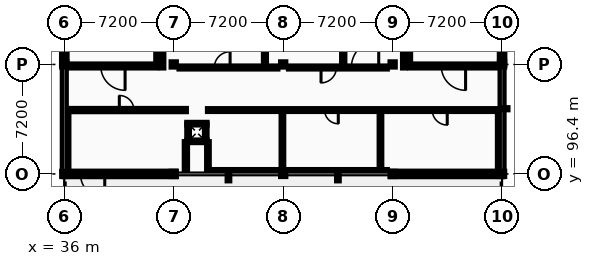
"""IFC4 building model, lengths in metres.
Left out: names, types, materials, properties, quantities, classifications, styles, units other than length and angle.
Written with IfcOpenShell. Run it as: python <this file> out.ifc"""

import sys

from ifc_helpers import new_model, si_unit, direction, frame, frame_2d, origin, origin_2d, place, context, subcontext, project, spatial, rectangle, i_section, extrude, element, fill, save


model = new_model("IFC4")
c1 = context("Model", 3, precision=1e-05, world=origin(), true_north=direction((0.0, 1.0)))
c2 = subcontext(c1, "Body", "Model", "MODEL_VIEW")
j1 = project(units=[si_unit("LENGTHUNIT", "METRE"), si_unit("PLANEANGLEUNIT", "RADIAN")], contexts=[c1])
p1 = place(None, origin())
s1 = spatial("IfcSite", under=j1, at=p1, CompositionType="ELEMENT")
p2 = place(p1, origin())
s2 = spatial("IfcBuilding", under=s1, at=p2, CompositionType="ELEMENT")
p3 = place(p2, frame((0.0, 0.0, 22.8)))
s3 = spatial("IfcBuildingStorey", under=s2, at=p3, CompositionType="ELEMENT", Elevation=22.8)
for number, where, z_axis, x_axis in (
    (1, (36.0, 96.4, 0.0), (0.0, 0.0, 1.0), (1.0, 0.0, 0.0)),
    (2, (36.0, 103.6, 0.0), (0.0, 0.0, 1.0), (1.0, 0.0, 0.0)),
    (3, (43.2, 96.4, 0.0), (0.0, 0.0, 1.0), (1.0, 0.0, 0.0)),
    (4, (43.2, 103.6, 0.0), (0.0, 0.0, 1.0), (1.0, 0.0, 0.0)),
    (5, (50.4, 96.4, 0.0), (0.0, 0.0, 1.0), (1.0, 0.0, 0.0)),
    (6, (50.4, 103.6, 0.0), (0.0, 0.0, 1.0), (1.0, 0.0, 0.0)),
    (7, (57.6, 96.4, 0.0), (0.0, 0.0, 1.0), (1.0, 0.0, 0.0)),
    (8, (57.6, 103.6, 0.0), (0.0, 0.0, 1.0), (1.0, 0.0, 0.0)),
    (9, (64.8, 96.4, 0.0), (0.0, 0.0, 1.0), (1.0, 0.0, 0.0)),
    (10, (64.8, 103.6, 0.0), (0.0, 0.0, 1.0), (1.0, 0.0, 0.0)),
):
    element("IfcColumn", number, at=place(p3, frame(where, z_axis=z_axis, x_axis=x_axis)), inside=s3, PredefinedType="COLUMN", context=c2, shape_type="SweptSolid", body=[
        extrude(i_section(OverallWidth=0.28, OverallDepth=0.28, WebThickness=0.01, FlangeThickness=0.018, FilletRadius=0.024, at=origin_2d()), origin(), (0.0, 0.0, 1.0), 4.4),
    ])
p4 = place(p3, frame((36.0, 96.4, 0.0), z_axis=(0.0, 0.0, 1.0), x_axis=(1.0, 0.0, 0.0)))
e11 = element("IfcWall", 11, at=p4, inside=s3, PredefinedType="STANDARD", context=c2, shape_type="SweptSolid", body=[
    extrude(rectangle(XDim=7.31, YDim=0.3, at=frame_2d((3.655, 0.0))), origin(), (0.0, 0.0, 1.0), 4.035),
])
p5 = place(p4, frame((1.062, 0.0, 0.0)))
e12 = element("IfcOpeningElement", 12, at=p5, cuts=e11, PredefinedType="OPENING", context=c2, shape_type="SweptSolid", body=[
    extrude(rectangle(XDim=1.6, YDim=2.2, at=frame_2d((0.8, 1.1))), frame((0.0, 0.16, 0.0), z_axis=(0.0, -1.0, 0.0), x_axis=(1.0, 0.0, 0.0)), (0.0, 0.0, 1.0), 0.32),
])
p6 = place(p3, frame((57.49, 96.4, 0.0), z_axis=(0.0, 0.0, 1.0), x_axis=(1.0, 0.0, 0.0)))
e13 = element("IfcWall", 13, at=p6, inside=s3, PredefinedType="STANDARD", context=c2, shape_type="SweptSolid", body=[
    extrude(rectangle(XDim=7.31, YDim=0.3, at=frame_2d((3.655, 0.0))), origin(), (0.0, 0.0, 1.0), 4.035),
])
p7 = place(p3, frame((36.0, 106.8, 0.0), z_axis=(0.0, 0.0, 1.0), x_axis=(0.0, -1.0, 0.0)))
e14 = element("IfcWall", 14, at=p7, inside=s3, PredefinedType="STANDARD", context=c2, shape_type="SweptSolid", body=[
    extrude(rectangle(XDim=3.2, YDim=0.3, at=frame_2d((1.6, 0.0))), origin(), (0.0, 0.0, 1.0), 4.11),
])
p8 = place(p7, frame((1.034, 0.0, 0.95)))
e15 = element("IfcOpeningElement", 15, at=p8, cuts=e14, PredefinedType="OPENING", context=c2, shape_type="SweptSolid", body=[
    extrude(rectangle(XDim=1.132, YDim=1.296, at=frame_2d((0.566, 0.648))), frame((0.0, 0.16, 0.0), z_axis=(0.0, -1.0, 0.0), x_axis=(1.0, 0.0, 0.0)), (0.0, 0.0, 1.0), 0.32),
])
p9 = place(p3, frame((64.8, 103.6, 0.0), z_axis=(0.0, 0.0, 1.0), x_axis=(0.0, 1.0, 0.0)))
e16 = element("IfcWall", 16, at=p9, inside=s3, PredefinedType="STANDARD", context=c2, shape_type="SweptSolid", body=[
    extrude(rectangle(XDim=3.2, YDim=0.3, at=frame_2d((1.6, 0.0))), origin(), (0.0, 0.0, 1.0), 4.11),
])
p10 = place(p9, frame((1.0, 0.0, 0.95)))
e17 = element("IfcOpeningElement", 17, at=p10, cuts=e16, PredefinedType="OPENING", context=c2, shape_type="SweptSolid", body=[
    extrude(rectangle(XDim=1.2, YDim=1.296, at=frame_2d((0.6, 0.648))), frame((0.0, 0.16, 0.0), z_axis=(0.0, -1.0, 0.0), x_axis=(1.0, 0.0, 0.0)), (0.0, 0.0, 1.0), 0.32),
])
for number, where, z_axis, x_axis in (
    (18, (36.0, 96.6, 4.4), (0.0, 0.0, 1.0), (0.0, 1.0, 0.0)),
    (19, (64.8, 96.6, 4.4), (0.0, 0.0, 1.0), (0.0, 1.0, 0.0)),
):
    element("IfcWall", number, at=place(p3, frame(where, z_axis=z_axis, x_axis=x_axis)), inside=s3, PredefinedType="PARAPET", context=c2, shape_type="SweptSolid", body=[
        extrude(rectangle(XDim=21.2, YDim=0.2, at=frame_2d((10.6, 0.0))), origin(), (0.0, 0.0, 1.0), 0.55),
    ])
p11 = place(p3, frame((36.35, 103.5, 0.0), z_axis=(0.0, 0.0, 1.0), x_axis=(1.0, 0.0, 0.0)))
e20 = element("IfcWall", 20, at=p11, inside=s3, PredefinedType="PARTITIONING", context=c2, shape_type="SweptSolid", body=[
    extrude(rectangle(XDim=5.7, YDim=0.2, at=frame_2d((2.85, 0.0))), origin(), (0.0, 0.0, 1.0), 4.035),
])
p12 = place(p11, frame((2.05, 0.0, 0.0)))
e21 = element("IfcOpeningElement", 21, at=p12, cuts=e20, PredefinedType="OPENING", context=c2, shape_type="SweptSolid", body=[
    extrude(rectangle(XDim=1.6, YDim=2.2, at=frame_2d((0.8, 1.1))), frame((0.0, 0.11, 0.0), z_axis=(0.0, -1.0, 0.0), x_axis=(1.0, 0.0, 0.0)), (0.0, 0.0, 1.0), 0.22),
])
p13 = place(p3, frame((42.15, 103.6, 0.0), z_axis=(0.0, 0.0, 1.0), x_axis=(0.0, 1.0, 0.0)))
e22 = element("IfcWall", 22, at=p13, inside=s3, PredefinedType="PARTITIONING", context=c2, shape_type="SweptSolid", body=[
    extrude(rectangle(XDim=3.2, YDim=0.2, at=frame_2d((1.6, 0.0))), origin(), (0.0, 0.0, 1.0), 4.18),
])
p14 = place(p3, frame((58.75, 103.5, 0.0), z_axis=(0.0, 0.0, 1.0), x_axis=(1.0, 0.0, 0.0)))
e23 = element("IfcWall", 23, at=p14, inside=s3, PredefinedType="PARTITIONING", context=c2, shape_type="SweptSolid", body=[
    extrude(rectangle(XDim=5.7, YDim=0.2, at=frame_2d((2.85, 0.0))), origin(), (0.0, 0.0, 1.0), 4.035),
])
p15 = place(p14, frame((2.05, 0.0, 0.0)))
e24 = element("IfcOpeningElement", 24, at=p15, cuts=e23, PredefinedType="OPENING", context=c2, shape_type="SweptSolid", body=[
    extrude(rectangle(XDim=1.6, YDim=2.2, at=frame_2d((0.8, 1.1))), frame((0.0, 0.11, 0.0), z_axis=(0.0, -1.0, 0.0), x_axis=(1.0, 0.0, 0.0)), (0.0, 0.0, 1.0), 0.22),
])
p16 = place(p3, frame((58.65, 103.6, 0.0), z_axis=(0.0, 0.0, 1.0), x_axis=(0.0, 1.0, 0.0)))
e25 = element("IfcWall", 25, at=p16, inside=s3, PredefinedType="PARTITIONING", context=c2, shape_type="SweptSolid", body=[
    extrude(rectangle(XDim=3.2, YDim=0.2, at=frame_2d((1.6, 0.0))), origin(), (0.0, 0.0, 1.0), 4.18),
])
for number, where, z_axis, x_axis in (
    (26, (44.09, 98.545, 0.0), (0.0, 0.0, 1.0), (1.0, 0.0, 0.0)),
    (27, (44.09, 99.705, 0.0), (0.0, 0.0, 1.0), (1.0, 0.0, 0.0)),
):
    element("IfcWall", number, at=place(p3, frame(where, z_axis=z_axis, x_axis=x_axis)), inside=s3, PredefinedType="PARTITIONING", context=c2, shape_type="SweptSolid", body=[
        extrude(rectangle(XDim=1.27, YDim=0.11, at=frame_2d((0.635, 0.0))), origin(), (0.0, 0.0, 1.0), 4.18),
    ])
for number, where, z_axis, x_axis in (
    (28, (44.145, 98.6, 0.0), (0.0, 0.0, 1.0), (0.0, 1.0, 0.0)),
    (29, (45.305, 98.6, 0.0), (0.0, 0.0, 1.0), (0.0, 1.0, 0.0)),
):
    element("IfcWall", number, at=place(p3, frame(where, z_axis=z_axis, x_axis=x_axis)), inside=s3, PredefinedType="PARTITIONING", context=c2, shape_type="SweptSolid", body=[
        extrude(rectangle(XDim=1.05, YDim=0.11, at=frame_2d((0.525, 0.0))), origin(), (0.0, 0.0, 1.0), 4.18),
    ])
p17 = place(p3, frame((45.45, 96.6, 0.0), z_axis=(0.0, 0.0, 1.0), x_axis=(1.0, 0.0, 0.0)))
e30 = element("IfcWall", 30, at=p17, inside=s3, PredefinedType="PARTITIONING", context=c2, shape_type="SweptSolid", body=[
    extrude(rectangle(XDim=4.57, YDim=0.11, at=frame_2d((2.285, 0.0))), origin(), (0.0, 0.0, 1.0), 4.035),
])
p18 = place(p3, frame((50.78, 96.6, 0.0), z_axis=(0.0, 0.0, 1.0), x_axis=(1.0, 0.0, 0.0)))
e31 = element("IfcWall", 31, at=p18, inside=s3, PredefinedType="PARTITIONING", context=c2, shape_type="SweptSolid", body=[
    extrude(rectangle(XDim=6.44, YDim=0.11, at=frame_2d((3.22, 0.0))), origin(), (0.0, 0.0, 1.0), 4.035),
])
p19 = place(p3, frame((36.2, 100.6, 0.0), z_axis=(0.0, 0.0, 1.0), x_axis=(1.0, 0.0, 0.0)))
e32 = element("IfcWall", 32, at=p19, inside=s3, PredefinedType="PARTITIONING", context=c2, shape_type="SweptSolid", body=[
    extrude(rectangle(XDim=7.8, YDim=0.15, at=frame_2d((3.9, 0.0))), origin(), (0.0, 0.0, 1.0), 4.18),
])
p20 = place(p19, frame((3.421, 0.0, 0.0)))
e33 = element("IfcOpeningElement", 33, at=p20, cuts=e32, PredefinedType="OPENING", context=c2, shape_type="SweptSolid", body=[
    extrude(rectangle(XDim=0.958, YDim=2.096, at=frame_2d((0.479, 1.048))), frame((0.0, 0.085, 0.0), z_axis=(0.0, -1.0, 0.0), x_axis=(1.0, 0.0, 0.0)), (0.0, 0.0, 1.0), 0.17),
])
p21 = place(p3, frame((45.45, 100.6, 0.0), z_axis=(0.0, 0.0, 1.0), x_axis=(1.0, 0.0, 0.0)))
e34 = element("IfcWall", 34, at=p21, inside=s3, PredefinedType="PARTITIONING", context=c2, shape_type="SweptSolid", body=[
    extrude(rectangle(XDim=19.15, YDim=0.125, at=frame_2d((9.575, 0.0))), origin(), (0.0, 0.0, 1.0), 4.18),
])
p22 = place(p21, frame((0.45, 0.0, 0.0)))
e35 = element("IfcOpeningElement", 35, at=p22, cuts=e34, PredefinedType="OPENING", context=c2, shape_type="SweptSolid", body=[
    extrude(rectangle(XDim=1.0, YDim=2.1, at=frame_2d((0.5, 1.05))), frame((0.0, 0.073, 0.0), z_axis=(0.0, -1.0, 0.0), x_axis=(1.0, 0.0, 0.0)), (0.0, 0.0, 1.0), 0.145),
])
p23 = place(p21, frame((7.675, 0.0, 0.0)))
e36 = element("IfcOpeningElement", 36, at=p23, cuts=e34, PredefinedType="OPENING", context=c2, shape_type="SweptSolid", body=[
    extrude(rectangle(XDim=0.9, YDim=2.1, at=frame_2d((0.45, 1.05))), frame((0.0, 0.073, 0.0), z_axis=(0.0, -1.0, 0.0), x_axis=(1.0, 0.0, 0.0)), (0.0, 0.0, 1.0), 0.145),
])
p24 = place(p21, frame((14.758, 0.0, 0.0)))
e37 = element("IfcOpeningElement", 37, at=p24, cuts=e34, PredefinedType="OPENING", context=c2, shape_type="SweptSolid", body=[
    extrude(rectangle(XDim=0.984, YDim=2.096, at=frame_2d((0.492, 1.048))), frame((0.0, 0.073, 0.0), z_axis=(0.0, -1.0, 0.0), x_axis=(1.0, 0.0, 0.0)), (0.0, 0.0, 1.0), 0.145),
])
p25 = place(p3, frame((43.58, 103.4, 0.0), z_axis=(0.0, 0.0, 1.0), x_axis=(1.0, 0.0, 0.0)))
e38 = element("IfcWall", 38, at=p25, inside=s3, PredefinedType="PARTITIONING", context=c2, shape_type="SweptSolid", body=[
    extrude(rectangle(XDim=6.44, YDim=0.135, at=frame_2d((3.22, 0.0))), origin(), (0.0, 0.0, 1.0), 4.035),
])
p26 = place(p25, frame((2.292, 0.0, 0.0)))
e39 = element("IfcOpeningElement", 39, at=p26, cuts=e38, PredefinedType="OPENING", context=c2, shape_type="SweptSolid", body=[
    extrude(rectangle(XDim=1.036, YDim=2.096, at=frame_2d((0.518, 1.048))), frame((0.0, 0.078, 0.0), z_axis=(0.0, -1.0, 0.0), x_axis=(1.0, 0.0, 0.0)), (0.0, 0.0, 1.0), 0.155),
])
p27 = place(p3, frame((50.78, 103.4, 0.0), z_axis=(0.0, 0.0, 1.0), x_axis=(1.0, 0.0, 0.0)))
e40 = element("IfcWall", 40, at=p27, inside=s3, PredefinedType="PARTITIONING", context=c2, shape_type="SweptSolid", body=[
    extrude(rectangle(XDim=6.44, YDim=0.135, at=frame_2d((3.22, 0.0))), origin(), (0.0, 0.0, 1.0), 4.035),
])
p28 = place(p27, frame((4.105, 0.0, 0.0)))
e41 = element("IfcOpeningElement", 41, at=p28, cuts=e40, PredefinedType="OPENING", context=c2, shape_type="SweptSolid", body=[
    extrude(rectangle(XDim=1.8, YDim=2.3, at=frame_2d((0.9, 1.15))), frame((0.0, 0.078, 0.0), z_axis=(0.0, -1.0, 0.0), x_axis=(1.0, 0.0, 0.0)), (0.0, 0.0, 1.0), 0.155),
])
p29 = place(p27, frame((2.11, 0.0, 0.0)))
e42 = element("IfcOpeningElement", 42, at=p29, cuts=e40, PredefinedType="OPENING", context=c2, shape_type="SweptSolid", body=[
    extrude(rectangle(XDim=1.01, YDim=2.096, at=frame_2d((0.505, 1.048))), frame((0.0, 0.078, 0.0), z_axis=(0.0, -1.0, 0.0), x_axis=(1.0, 0.0, 0.0)), (0.0, 0.0, 1.0), 0.155),
])
p30 = place(p3, frame((36.2, 96.78, 0.0), z_axis=(0.0, 0.0, 1.0), x_axis=(0.0, 1.0, 0.0)))
e43 = element("IfcWall", 43, at=p30, inside=s3, PredefinedType="PARTITIONING", context=c2, shape_type="SweptSolid", body=[
    extrude(rectangle(XDim=3.745, YDim=0.142, at=frame_2d((1.873, 0.0))), origin(), (0.0, 0.0, 1.0), 4.11),
])
p31 = place(p3, frame((42.45, 103.4, 0.0), z_axis=(0.0, 0.0, 1.0), x_axis=(0.0, 1.0, 0.0)))
e44 = element("IfcWall", 44, at=p31, inside=s3, PredefinedType="PARTITIONING", context=c2, shape_type="SweptSolid", body=[
    extrude(rectangle(XDim=3.225, YDim=0.135, at=frame_2d((1.613, 0.0))), origin(), (0.0, 0.0, 1.0), 4.18),
])
p32 = place(p3, frame((44.0, 96.6, 0.0), z_axis=(0.0, 0.0, 1.0), x_axis=(0.0, 1.0, 0.0)))
e45 = element("IfcWall", 45, at=p32, inside=s3, PredefinedType="PARTITIONING", context=c2, shape_type="SweptSolid", body=[
    extrude(rectangle(XDim=1.89, YDim=0.15, at=frame_2d((0.945, 0.0))), origin(), (0.0, 0.0, 1.0), 4.18),
])
p33 = place(p3, frame((45.45, 96.655, 0.0), z_axis=(0.0, 0.0, 1.0), x_axis=(0.0, 1.0, 0.0)))
e46 = element("IfcWall", 46, at=p33, inside=s3, PredefinedType="PARTITIONING", context=c2, shape_type="SweptSolid", body=[
    extrude(rectangle(XDim=1.835, YDim=0.11, at=frame_2d((0.917, 0.0))), origin(), (0.0, 0.0, 1.0), 4.18),
])
p34 = place(p3, frame((49.2, 103.468, 0.0), z_axis=(0.0, 0.0, 1.0), x_axis=(0.0, 1.0, 0.0)))
e47 = element("IfcWall", 47, at=p34, inside=s3, PredefinedType="PARTITIONING", context=c2, shape_type="SweptSolid", body=[
    extrude(rectangle(XDim=14.333, YDim=0.135, at=frame_2d((7.166, 0.0))), origin(), (0.0, 0.0, 1.0), 4.18),
])
p35 = place(p3, frame((50.35, 96.78, 0.0), z_axis=(0.0, 0.0, 1.0), x_axis=(0.0, 1.0, 0.0)))
e48 = element("IfcWall", 48, at=p35, inside=s3, PredefinedType="PARTITIONING", context=c2, shape_type="SweptSolid", body=[
    extrude(rectangle(XDim=3.758, YDim=0.11, at=frame_2d((1.879, 0.0))), origin(), (0.0, 0.0, 1.0), 4.18),
])
p36 = place(p3, frame((54.35, 103.468, 0.0), z_axis=(0.0, 0.0, 1.0), x_axis=(0.0, 1.0, 0.0)))
e49 = element("IfcWall", 49, at=p36, inside=s3, PredefinedType="PARTITIONING", context=c2, shape_type="SweptSolid", body=[
    extrude(rectangle(XDim=14.333, YDim=0.15, at=frame_2d((7.166, 0.0))), origin(), (0.0, 0.0, 1.0), 4.18),
])
p37 = place(p3, frame((56.8, 96.655, 0.0), z_axis=(0.0, 0.0, 1.0), x_axis=(0.0, 1.0, 0.0)))
e50 = element("IfcWall", 50, at=p37, inside=s3, PredefinedType="PARTITIONING", context=c2, shape_type="SweptSolid", body=[
    extrude(rectangle(XDim=3.883, YDim=0.11, at=frame_2d((1.941, 0.0))), origin(), (0.0, 0.0, 1.0), 4.18),
])
p38 = place(p3, frame((58.35, 103.4, 0.0), z_axis=(0.0, 0.0, 1.0), x_axis=(0.0, 1.0, 0.0)))
e51 = element("IfcWall", 51, at=p38, inside=s3, PredefinedType="PARTITIONING", context=c2, shape_type="SweptSolid", body=[
    extrude(rectangle(XDim=3.225, YDim=0.135, at=frame_2d((1.613, 0.0))), origin(), (0.0, 0.0, 1.0), 4.18),
])
p39 = place(p3, frame((64.6, 96.78, 0.0), z_axis=(0.0, 0.0, 1.0), x_axis=(0.0, 1.0, 0.0)))
e52 = element("IfcWall", 52, at=p39, inside=s3, PredefinedType="PARTITIONING", context=c2, shape_type="SweptSolid", body=[
    extrude(rectangle(XDim=3.758, YDim=0.15, at=frame_2d((1.879, 0.0))), origin(), (0.0, 0.0, 1.0), 4.11),
])
p40 = place(p5, origin())
e53 = element("IfcDoor", 53, at=p40, inside=s3, OperationType="DOUBLE_DOOR_SINGLE_SWING", PredefinedType="DOOR", context=c2, shape_type="SweptSolid", body=[
    extrude(rectangle(XDim=1.6, YDim=2.2, at=frame_2d((0.8, 1.1))), frame((0.0, 0.025, 0.0), z_axis=(0.0, -1.0, 0.0), x_axis=(1.0, 0.0, 0.0)), (0.0, 0.0, 1.0), 0.05),
])
fill(e12, e53)
p41 = place(p12, origin())
e54 = element("IfcDoor", 54, at=p41, inside=s3, OperationType="DOUBLE_DOOR_SINGLE_SWING", PredefinedType="DOOR", context=c2, shape_type="SweptSolid", body=[
    extrude(rectangle(XDim=1.6, YDim=2.2, at=frame_2d((0.8, 1.1))), frame((0.0, 0.025, 0.0), z_axis=(0.0, -1.0, 0.0), x_axis=(1.0, 0.0, 0.0)), (0.0, 0.0, 1.0), 0.05),
])
fill(e21, e54)
p42 = place(p15, origin())
e55 = element("IfcDoor", 55, at=p42, inside=s3, OperationType="DOUBLE_DOOR_SINGLE_SWING", PredefinedType="DOOR", context=c2, shape_type="SweptSolid", body=[
    extrude(rectangle(XDim=1.6, YDim=2.2, at=frame_2d((0.8, 1.1))), frame((0.0, 0.025, 0.0), z_axis=(0.0, -1.0, 0.0), x_axis=(1.0, 0.0, 0.0)), (0.0, 0.0, 1.0), 0.05),
])
fill(e24, e55)
p43 = place(p22, origin())
e56 = element("IfcDoor", 56, at=p43, inside=s3, OperationType="SLIDING_TO_LEFT", PredefinedType="DOOR", context=c2, shape_type="SweptSolid", body=[
    extrude(rectangle(XDim=1.0, YDim=2.1, at=frame_2d((0.5, 1.05))), frame((0.0, 0.025, 0.0), z_axis=(0.0, -1.0, 0.0), x_axis=(1.0, 0.0, 0.0)), (0.0, 0.0, 1.0), 0.05),
])
fill(e35, e56)
p44 = place(p23, origin())
e57 = element("IfcDoor", 57, at=p44, inside=s3, OperationType="SINGLE_SWING_RIGHT", PredefinedType="DOOR", context=c2, shape_type="SweptSolid", body=[
    extrude(rectangle(XDim=0.9, YDim=2.1, at=frame_2d((0.45, 1.05))), frame((0.0, 0.025, 0.0), z_axis=(0.0, -1.0, 0.0), x_axis=(1.0, 0.0, 0.0)), (0.0, 0.0, 1.0), 0.05),
])
fill(e36, e57)
p45 = place(p20, origin())
e58 = element("IfcDoor", 58, at=p45, inside=s3, OperationType="SINGLE_SWING_LEFT", PredefinedType="DOOR", context=c2, shape_type="SweptSolid", body=[
    extrude(rectangle(XDim=0.958, YDim=2.096, at=frame_2d((0.479, 1.048))), frame((0.0, 0.025, 0.0), z_axis=(0.0, -1.0, 0.0), x_axis=(1.0, 0.0, 0.0)), (0.0, 0.0, 1.0), 0.05),
])
fill(e33, e58)
p46 = place(p24, origin())
e59 = element("IfcDoor", 59, at=p46, inside=s3, OperationType="SINGLE_SWING_RIGHT", PredefinedType="DOOR", context=c2, shape_type="SweptSolid", body=[
    extrude(rectangle(XDim=0.984, YDim=2.096, at=frame_2d((0.492, 1.048))), frame((0.0, 0.025, 0.0), z_axis=(0.0, -1.0, 0.0), x_axis=(1.0, 0.0, 0.0)), (0.0, 0.0, 1.0), 0.05),
])
fill(e37, e59)
p47 = place(p28, frame((1.8, 0.0, 0.0), z_axis=(0.0, 0.0, 1.0), x_axis=(-1.0, 0.0, 0.0)))
e60 = element("IfcDoor", 60, at=p47, inside=s3, OperationType="DOUBLE_DOOR_SINGLE_SWING", PredefinedType="DOOR", context=c2, shape_type="SweptSolid", body=[
    extrude(rectangle(XDim=1.8, YDim=2.3, at=frame_2d((0.9, 1.15))), frame((0.0, 0.025, 0.0), z_axis=(0.0, -1.0, 0.0), x_axis=(1.0, 0.0, 0.0)), (0.0, 0.0, 1.0), 0.05),
])
fill(e41, e60)
p48 = place(p29, frame((1.01, 0.0, 0.0), z_axis=(0.0, 0.0, 1.0), x_axis=(-1.0, 0.0, 0.0)))
e61 = element("IfcDoor", 61, at=p48, inside=s3, OperationType="SINGLE_SWING_LEFT", PredefinedType="DOOR", context=c2, shape_type="SweptSolid", body=[
    extrude(rectangle(XDim=1.01, YDim=2.096, at=frame_2d((0.505, 1.048))), frame((0.0, 0.025, 0.0), z_axis=(0.0, -1.0, 0.0), x_axis=(1.0, 0.0, 0.0)), (0.0, 0.0, 1.0), 0.05),
])
fill(e42, e61)
p49 = place(p26, frame((1.036, 0.0, 0.0), z_axis=(0.0, 0.0, 1.0), x_axis=(-1.0, 0.0, 0.0)))
e62 = element("IfcDoor", 62, at=p49, inside=s3, OperationType="SINGLE_SWING_RIGHT", PredefinedType="DOOR", context=c2, shape_type="SweptSolid", body=[
    extrude(rectangle(XDim=1.036, YDim=2.096, at=frame_2d((0.518, 1.048))), frame((0.0, 0.025, 0.0), z_axis=(0.0, -1.0, 0.0), x_axis=(1.0, 0.0, 0.0)), (0.0, 0.0, 1.0), 0.05),
])
fill(e39, e62)
save(model, sys.argv[1])
